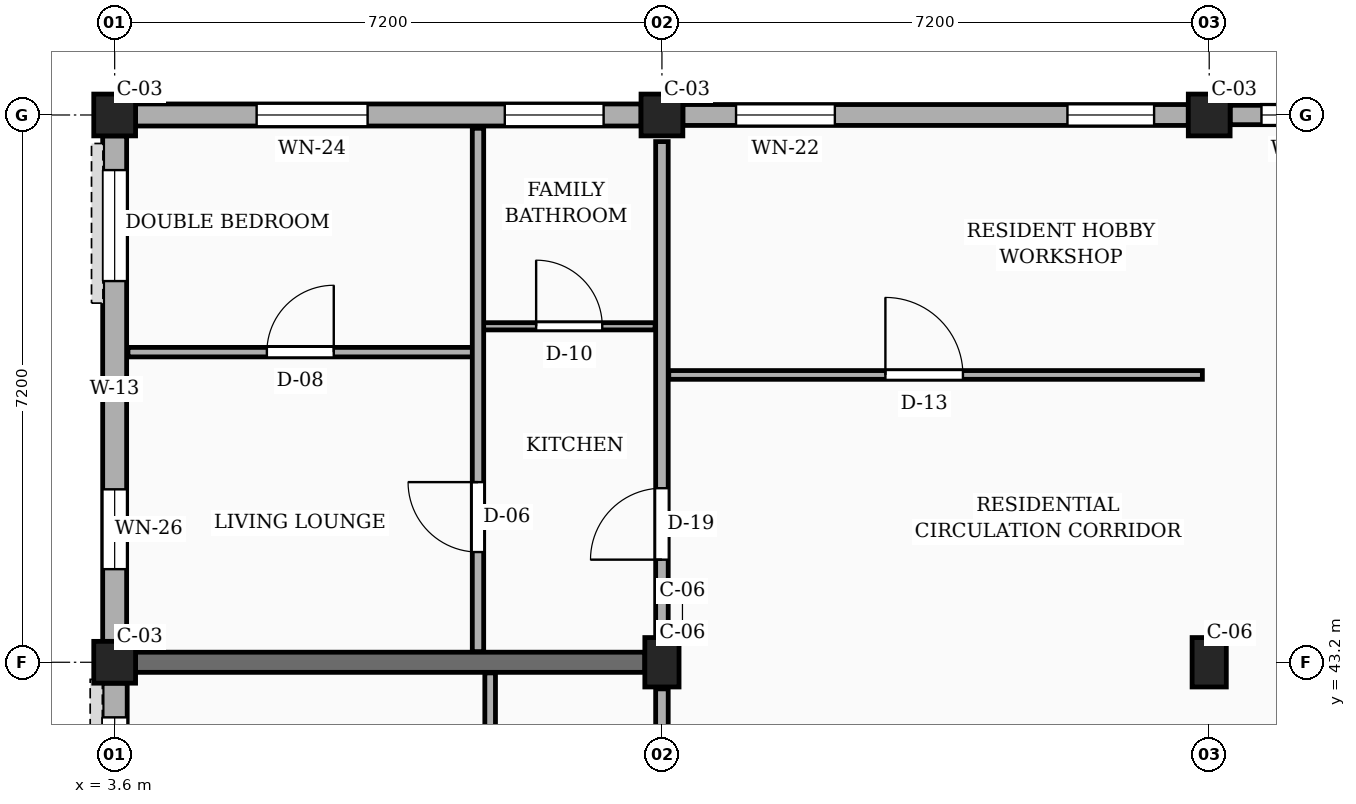
"""IFC4 building model, lengths in metres.
Left out: names, types, materials, properties, quantities, classifications, styles, units other than length and angle.
Written with IfcOpenShell. Run it as: python <this file> out.ifc"""

import sys

from ifc_helpers import new_model, si_unit, direction, frame, frame_2d, origin, origin_2d, place, context, subcontext, project, spatial, rectangle, extrude, element, fill, save


model = new_model("IFC4")
c1 = context("Model", 3, precision=1e-05, world=origin(), true_north=direction((0.0, 1.0)))
c2 = subcontext(c1, "Body", "Model", "MODEL_VIEW")
j1 = project(units=[si_unit("LENGTHUNIT", "METRE"), si_unit("PLANEANGLEUNIT", "RADIAN")], contexts=[c1])
p1 = place(None, origin())
s1 = spatial("IfcSite", under=j1, at=p1, CompositionType="ELEMENT")
p2 = place(p1, origin())
s2 = spatial("IfcBuilding", under=s1, at=p2, CompositionType="ELEMENT")
p3 = place(p2, frame((0.0, 0.0, 10.8)))
s3 = spatial("IfcBuildingStorey", under=s2, at=p3, CompositionType="ELEMENT", Elevation=10.8)
for number, where, z_axis, x_axis in (
    (1, (3.6, 43.2, 0.0), (0.0, 0.0, 1.0), (1.0, 0.0, 0.0)),
    (2, (3.6, 50.4, 0.0), (0.0, 0.0, 1.0), (1.0, 0.0, 0.0)),
):
    element("IfcColumn", number, at=place(p3, frame(where, z_axis=z_axis, x_axis=x_axis)), inside=s3, PredefinedType="COLUMN", context=c2, shape_type="SweptSolid", body=[
        extrude(rectangle(XDim=0.55, YDim=0.55, at=origin_2d()), origin(), (0.0, 0.0, 1.0), 3.15),
    ])
p4 = place(p3, frame((10.8, 43.2, 0.0), z_axis=(0.0, 0.0, 1.0), x_axis=(1.0, 0.0, 0.0)))
e3 = element("IfcColumn", 3, at=p4, inside=s3, PredefinedType="COLUMN", context=c2, shape_type="SweptSolid", body=[
    extrude(rectangle(XDim=0.45, YDim=0.65, at=origin_2d()), origin(), (0.0, 0.0, 1.0), 3.15),
])
p5 = place(p3, frame((10.8, 50.4, 0.0), z_axis=(0.0, 0.0, 1.0), x_axis=(1.0, 0.0, 0.0)))
e4 = element("IfcColumn", 4, at=p5, inside=s3, PredefinedType="COLUMN", context=c2, shape_type="SweptSolid", body=[
    extrude(rectangle(XDim=0.55, YDim=0.55, at=origin_2d()), origin(), (0.0, 0.0, 1.0), 3.15),
])
p6 = place(p3, frame((18.0, 43.2, 0.0), z_axis=(0.0, 0.0, 1.0), x_axis=(1.0, 0.0, 0.0)))
e5 = element("IfcColumn", 5, at=p6, inside=s3, PredefinedType="COLUMN", context=c2, shape_type="SweptSolid", body=[
    extrude(rectangle(XDim=0.45, YDim=0.65, at=origin_2d()), origin(), (0.0, 0.0, 1.0), 3.15),
])
p7 = place(p3, frame((18.0, 50.4, 0.0), z_axis=(0.0, 0.0, 1.0), x_axis=(1.0, 0.0, 0.0)))
e6 = element("IfcColumn", 6, at=p7, inside=s3, PredefinedType="COLUMN", context=c2, shape_type="SweptSolid", body=[
    extrude(rectangle(XDim=0.55, YDim=0.55, at=origin_2d()), origin(), (0.0, 0.0, 1.0), 3.15),
])
p8 = place(p3, frame((3.875, 43.2, 0.0), z_axis=(0.0, 0.0, 1.0), x_axis=(1.0, 0.0, 0.0)))
e7 = element("IfcWall", 7, at=p8, inside=s3, PredefinedType="SOLIDWALL", context=c2, shape_type="SweptSolid", body=[
    extrude(rectangle(XDim=6.7, YDim=0.265, at=frame_2d((3.35, 0.0))), origin(), (0.0, 0.0, 1.0), 2.17),
])
p9 = place(p3, frame((24.925, 50.4, 0.0), z_axis=(0.0, 0.0, 1.0), x_axis=(-1.0, 0.0, 0.0)))
e8 = element("IfcWall", 8, at=p9, inside=s3, PredefinedType="SOLIDWALL", context=c2, shape_type="SweptSolid", body=[
    extrude(rectangle(XDim=6.65, YDim=0.255, at=frame_2d((3.325, 0.0))), origin(), (0.0, 0.0, 1.0), 2.44),
])
p10 = place(p9, frame((2.07, 0.0, 0.78)))
e9 = element("IfcOpeningElement", 9, at=p10, cuts=e8, PredefinedType="OPENING", context=c2, shape_type="SweptSolid", body=[
    extrude(rectangle(XDim=0.98, YDim=1.36, at=frame_2d((0.49, 0.68))), frame((0.0, 0.137, 0.0), z_axis=(0.0, -1.0, 0.0), x_axis=(1.0, 0.0, 0.0)), (0.0, 0.0, 1.0), 0.275),
])
p11 = place(p9, frame((5.097, 0.0, 0.78)))
e10 = element("IfcOpeningElement", 10, at=p11, cuts=e8, PredefinedType="OPENING", context=c2, shape_type="SweptSolid", body=[
    extrude(rectangle(XDim=1.14, YDim=1.36, at=frame_2d((0.57, 0.68))), frame((0.0, 0.137, 0.0), z_axis=(0.0, -1.0, 0.0), x_axis=(1.0, 0.0, 0.0)), (0.0, 0.0, 1.0), 0.275),
])
p12 = place(p3, frame((17.725, 50.4, 0.0), z_axis=(0.0, 0.0, 1.0), x_axis=(-1.0, 0.0, 0.0)))
e11 = element("IfcWall", 11, at=p12, inside=s3, PredefinedType="SOLIDWALL", context=c2, shape_type="SweptSolid", body=[
    extrude(rectangle(XDim=6.65, YDim=0.275, at=frame_2d((3.325, 0.0))), origin(), (0.0, 0.0, 1.0), 2.44),
])
p13 = place(p12, frame((0.45, 0.0, 0.78)))
e12 = element("IfcOpeningElement", 12, at=p13, cuts=e11, PredefinedType="OPENING", context=c2, shape_type="SweptSolid", body=[
    extrude(rectangle(XDim=1.14, YDim=1.36, at=frame_2d((0.57, 0.68))), frame((0.0, 0.147, 0.0), z_axis=(0.0, -1.0, 0.0), x_axis=(1.0, 0.0, 0.0)), (0.0, 0.0, 1.0), 0.295),
])
p14 = place(p12, frame((4.65, 0.0, 0.78)))
e13 = element("IfcOpeningElement", 13, at=p14, cuts=e11, PredefinedType="OPENING", context=c2, shape_type="SweptSolid", body=[
    extrude(rectangle(XDim=1.3, YDim=1.36, at=frame_2d((0.65, 0.68))), frame((0.0, 0.147, 0.0), z_axis=(0.0, -1.0, 0.0), x_axis=(1.0, 0.0, 0.0)), (0.0, 0.0, 1.0), 0.295),
])
p15 = place(p3, frame((10.525, 50.4, 0.0), z_axis=(0.0, 0.0, 1.0), x_axis=(-1.0, 0.0, 0.0)))
e14 = element("IfcWall", 14, at=p15, inside=s3, PredefinedType="SOLIDWALL", context=c2, shape_type="SweptSolid", body=[
    extrude(rectangle(XDim=6.65, YDim=0.29, at=frame_2d((3.325, 0.0))), origin(), (0.0, 0.0, 1.0), 2.44),
])
p16 = place(p15, frame((0.492, 0.0, 0.78)))
e15 = element("IfcOpeningElement", 15, at=p16, cuts=e14, PredefinedType="OPENING", context=c2, shape_type="SweptSolid", body=[
    extrude(rectangle(XDim=1.3, YDim=1.36, at=frame_2d((0.65, 0.68))), frame((0.0, 0.155, 0.0), z_axis=(0.0, -1.0, 0.0), x_axis=(1.0, 0.0, 0.0)), (0.0, 0.0, 1.0), 0.31),
])
p17 = place(p15, frame((3.597, 0.0, 0.78)))
e16 = element("IfcOpeningElement", 16, at=p17, cuts=e14, PredefinedType="OPENING", context=c2, shape_type="SweptSolid", body=[
    extrude(rectangle(XDim=1.46, YDim=1.36, at=frame_2d((0.73, 0.68))), frame((0.0, 0.155, 0.0), z_axis=(0.0, -1.0, 0.0), x_axis=(1.0, 0.0, 0.0)), (0.0, 0.0, 1.0), 0.31),
])
p18 = place(p3, frame((3.6, 50.125, 0.0), z_axis=(0.0, 0.0, 1.0), x_axis=(0.0, -1.0, 0.0)))
e17 = element("IfcWall", 17, at=p18, inside=s3, PredefinedType="SOLIDWALL", context=c2, shape_type="SweptSolid", body=[
    extrude(rectangle(XDim=6.65, YDim=0.315, at=frame_2d((3.325, 0.0))), origin(), (0.0, 0.0, 1.0), 2.44),
])
p19 = place(p18, frame((0.45, 0.0, 0.78)))
e18 = element("IfcOpeningElement", 18, at=p19, cuts=e17, PredefinedType="OPENING", context=c2, shape_type="SweptSolid", body=[
    extrude(rectangle(XDim=1.46, YDim=1.36, at=frame_2d((0.73, 0.68))), frame((0.0, 0.167, 0.0), z_axis=(0.0, -1.0, 0.0), x_axis=(1.0, 0.0, 0.0)), (0.0, 0.0, 1.0), 0.335),
])
p20 = place(p18, frame((4.65, 0.0, 0.78)))
e19 = element("IfcOpeningElement", 19, at=p20, cuts=e17, PredefinedType="OPENING", context=c2, shape_type="SweptSolid", body=[
    extrude(rectangle(XDim=1.05, YDim=1.44, at=frame_2d((0.525, 0.72))), frame((0.0, 0.167, 0.0), z_axis=(0.0, -1.0, 0.0), x_axis=(1.0, 0.0, 0.0)), (0.0, 0.0, 1.0), 0.335),
])
p21 = place(p3, frame((3.6, 42.925, 0.0), z_axis=(0.0, 0.0, 1.0), x_axis=(0.0, -1.0, 0.0)))
e20 = element("IfcWall", 20, at=p21, inside=s3, PredefinedType="SOLIDWALL", context=c2, shape_type="SweptSolid", body=[
    extrude(rectangle(XDim=6.65, YDim=0.33, at=frame_2d((3.325, 0.0))), origin(), (0.0, 0.0, 1.0), 2.44),
])
p22 = place(p21, frame((0.45, 0.0, 0.78)))
e21 = element("IfcOpeningElement", 21, at=p22, cuts=e20, PredefinedType="OPENING", context=c2, shape_type="SweptSolid", body=[
    extrude(rectangle(XDim=1.05, YDim=1.44, at=frame_2d((0.525, 0.72))), frame((0.0, 0.175, 0.0), z_axis=(0.0, -1.0, 0.0), x_axis=(1.0, 0.0, 0.0)), (0.0, 0.0, 1.0), 0.35),
])
p23 = place(p21, frame((4.65, 0.0, 0.78)))
e22 = element("IfcOpeningElement", 22, at=p23, cuts=e20, PredefinedType="OPENING", context=c2, shape_type="SweptSolid", body=[
    extrude(rectangle(XDim=1.25, YDim=1.44, at=frame_2d((0.625, 0.72))), frame((0.0, 0.175, 0.0), z_axis=(0.0, -1.0, 0.0), x_axis=(1.0, 0.0, 0.0)), (0.0, 0.0, 1.0), 0.35),
])
p24 = place(p3, frame((10.8, 36.35, 0.0), z_axis=(0.0, 0.0, 1.0), x_axis=(0.0, 1.0, 0.0)))
e23 = element("IfcWall", 23, at=p24, inside=s3, PredefinedType="PARTITIONING", context=c2, shape_type="SweptSolid", body=[
    extrude(rectangle(XDim=6.5, YDim=0.165, at=frame_2d((3.25, 0.0))), origin(), (0.0, 0.0, 1.0), 2.22),
])
p25 = place(p24, frame((1.0, 0.0, 0.0)))
e24 = element("IfcOpeningElement", 24, at=p25, cuts=e23, PredefinedType="OPENING", context=c2, shape_type="SweptSolid", body=[
    extrude(rectangle(XDim=1.0, YDim=2.15, at=frame_2d((0.5, 1.075))), frame((0.0, 0.093, 0.0), z_axis=(0.0, -1.0, 0.0), x_axis=(1.0, 0.0, 0.0)), (0.0, 0.0, 1.0), 0.185),
])
p26 = place(p3, frame((10.8, 43.55, 0.0), z_axis=(0.0, 0.0, 1.0), x_axis=(0.0, 1.0, 0.0)))
e25 = element("IfcWall", 25, at=p26, inside=s3, PredefinedType="PARTITIONING", context=c2, shape_type="SweptSolid", body=[
    extrude(rectangle(XDim=6.5, YDim=0.165, at=frame_2d((3.25, 0.0))), origin(), (0.0, 0.0, 1.0), 2.22),
])
p27 = place(p26, frame((1.0, 0.0, 0.0)))
e26 = element("IfcOpeningElement", 26, at=p27, cuts=e25, PredefinedType="OPENING", context=c2, shape_type="SweptSolid", body=[
    extrude(rectangle(XDim=0.94, YDim=2.12, at=frame_2d((0.47, 1.06))), frame((0.0, 0.093, 0.0), z_axis=(0.0, -1.0, 0.0), x_axis=(1.0, 0.0, 0.0)), (0.0, 0.0, 1.0), 0.185),
])
p28 = place(p3, frame((8.54, 36.14, 0.0), z_axis=(0.0, 0.0, 1.0), x_axis=(0.0, 1.0, 0.0)))
e27 = element("IfcWall", 27, at=p28, inside=s3, PredefinedType="PARTITIONING", context=c2, shape_type="SweptSolid", body=[
    extrude(rectangle(XDim=6.92, YDim=0.14, at=frame_2d((3.46, 0.0))), origin(), (0.0, 0.0, 1.0), 2.305),
])
p29 = place(p28, frame((1.31, 0.0, 0.0)))
e28 = element("IfcOpeningElement", 28, at=p29, cuts=e27, PredefinedType="OPENING", context=c2, shape_type="SweptSolid", body=[
    extrude(rectangle(XDim=0.95, YDim=2.1, at=frame_2d((0.475, 1.05))), frame((0.0, 0.08, 0.0), z_axis=(0.0, -1.0, 0.0), x_axis=(1.0, 0.0, 0.0)), (0.0, 0.0, 1.0), 0.16),
])
p30 = place(p3, frame((10.89, 46.98, 0.0), z_axis=(0.0, 0.0, 1.0), x_axis=(1.0, 0.0, 0.0)))
e29 = element("IfcWall", 29, at=p30, inside=s3, PredefinedType="PARTITIONING", context=c2, shape_type="SweptSolid", body=[
    extrude(rectangle(XDim=7.02, YDim=0.115, at=frame_2d((3.51, 0.0))), origin(), (0.0, 0.0, 1.0), 2.305),
])
p31 = place(p30, frame((2.85, 0.0, 0.0)))
e30 = element("IfcOpeningElement", 30, at=p31, cuts=e29, PredefinedType="OPENING", context=c2, shape_type="SweptSolid", body=[
    extrude(rectangle(XDim=1.02, YDim=2.15, at=frame_2d((0.51, 1.075))), frame((0.0, 0.067, 0.0), z_axis=(0.0, -1.0, 0.0), x_axis=(1.0, 0.0, 0.0)), (0.0, 0.0, 1.0), 0.135),
])
p32 = place(p3, frame((3.775, 47.28, 0.0), z_axis=(0.0, 0.0, 1.0), x_axis=(1.0, 0.0, 0.0)))
e31 = element("IfcWall", 31, at=p32, inside=s3, PredefinedType="PARTITIONING", context=c2, shape_type="SweptSolid", body=[
    extrude(rectangle(XDim=4.535, YDim=0.125, at=frame_2d((2.268, 0.0))), origin(), (0.0, 0.0, 1.0), 2.305),
])
p33 = place(p32, frame((1.827, 0.0, 0.0)))
e32 = element("IfcOpeningElement", 32, at=p33, cuts=e31, PredefinedType="OPENING", context=c2, shape_type="SweptSolid", body=[
    extrude(rectangle(XDim=0.88, YDim=2.08, at=frame_2d((0.44, 1.04))), frame((0.0, 0.073, 0.0), z_axis=(0.0, -1.0, 0.0), x_axis=(1.0, 0.0, 0.0)), (0.0, 0.0, 1.0), 0.145),
])
p34 = place(p3, frame((8.45, 47.62, 0.0), z_axis=(0.0, 0.0, 1.0), x_axis=(1.0, 0.0, 0.0)))
e33 = element("IfcWall", 33, at=p34, inside=s3, PredefinedType="PARTITIONING", context=c2, shape_type="SweptSolid", body=[
    extrude(rectangle(XDim=2.26, YDim=0.095, at=frame_2d((1.13, 0.0))), origin(), (0.0, 0.0, 1.0), 2.305),
])
p35 = place(p34, frame((0.695, 0.0, 0.0)))
e34 = element("IfcOpeningElement", 34, at=p35, cuts=e33, PredefinedType="OPENING", context=c2, shape_type="SweptSolid", body=[
    extrude(rectangle(XDim=0.87, YDim=2.05, at=frame_2d((0.435, 1.025))), frame((0.0, 0.058, 0.0), z_axis=(0.0, -1.0, 0.0), x_axis=(1.0, 0.0, 0.0)), (0.0, 0.0, 1.0), 0.115),
])
p36 = place(p3, frame((8.38, 43.34, 0.0), z_axis=(0.0, 0.0, 1.0), x_axis=(0.0, 1.0, 0.0)))
e35 = element("IfcWall", 35, at=p36, inside=s3, PredefinedType="PARTITIONING", context=c2, shape_type="SweptSolid", body=[
    extrude(rectangle(XDim=6.885, YDim=0.15, at=frame_2d((3.442, 0.0))), origin(), (0.0, 0.0, 1.0), 2.305),
])
p37 = place(p36, frame((1.31, 0.0, 0.0)))
e36 = element("IfcOpeningElement", 36, at=p37, cuts=e35, PredefinedType="OPENING", context=c2, shape_type="SweptSolid", body=[
    extrude(rectangle(XDim=0.92, YDim=2.1, at=frame_2d((0.46, 1.05))), frame((0.0, 0.085, 0.0), z_axis=(0.0, -1.0, 0.0), x_axis=(1.0, 0.0, 0.0)), (0.0, 0.0, 1.0), 0.17),
])
p38 = place(p11, origin())
e37 = element("IfcWindow", 37, at=p38, inside=s3, PartitioningType="SINGLE_PANEL", PredefinedType="WINDOW", context=c2, shape_type="SweptSolid", body=[
    extrude(rectangle(XDim=1.14, YDim=1.36, at=frame_2d((0.57, 0.68))), frame((0.0, 0.03, 0.0), z_axis=(0.0, -1.0, 0.0), x_axis=(1.0, 0.0, 0.0)), (0.0, 0.0, 1.0), 0.06),
])
fill(e10, e37)
p39 = place(p13, origin())
e38 = element("IfcWindow", 38, at=p39, inside=s3, PartitioningType="SINGLE_PANEL", PredefinedType="WINDOW", context=c2, shape_type="SweptSolid", body=[
    extrude(rectangle(XDim=1.14, YDim=1.36, at=frame_2d((0.57, 0.68))), frame((0.0, 0.03, 0.0), z_axis=(0.0, -1.0, 0.0), x_axis=(1.0, 0.0, 0.0)), (0.0, 0.0, 1.0), 0.06),
])
fill(e12, e38)
p40 = place(p14, origin())
e39 = element("IfcWindow", 39, at=p40, inside=s3, PartitioningType="SINGLE_PANEL", PredefinedType="WINDOW", context=c2, shape_type="SweptSolid", body=[
    extrude(rectangle(XDim=1.3, YDim=1.36, at=frame_2d((0.65, 0.68))), frame((0.0, 0.03, 0.0), z_axis=(0.0, -1.0, 0.0), x_axis=(1.0, 0.0, 0.0)), (0.0, 0.0, 1.0), 0.06),
])
fill(e13, e39)
p41 = place(p16, origin())
e40 = element("IfcWindow", 40, at=p41, inside=s3, PartitioningType="SINGLE_PANEL", PredefinedType="WINDOW", context=c2, shape_type="SweptSolid", body=[
    extrude(rectangle(XDim=1.3, YDim=1.36, at=frame_2d((0.65, 0.68))), frame((0.0, 0.03, 0.0), z_axis=(0.0, -1.0, 0.0), x_axis=(1.0, 0.0, 0.0)), (0.0, 0.0, 1.0), 0.06),
])
fill(e15, e40)
p42 = place(p17, origin())
e41 = element("IfcWindow", 41, at=p42, inside=s3, PartitioningType="SINGLE_PANEL", PredefinedType="WINDOW", context=c2, shape_type="SweptSolid", body=[
    extrude(rectangle(XDim=1.46, YDim=1.36, at=frame_2d((0.73, 0.68))), frame((0.0, 0.03, 0.0), z_axis=(0.0, -1.0, 0.0), x_axis=(1.0, 0.0, 0.0)), (0.0, 0.0, 1.0), 0.06),
])
fill(e16, e41)
p43 = place(p19, origin())
e42 = element("IfcWindow", 42, at=p43, inside=s3, PartitioningType="SINGLE_PANEL", PredefinedType="WINDOW", context=c2, shape_type="SweptSolid", body=[
    extrude(rectangle(XDim=1.46, YDim=1.36, at=frame_2d((0.73, 0.68))), frame((0.0, 0.03, 0.0), z_axis=(0.0, -1.0, 0.0), x_axis=(1.0, 0.0, 0.0)), (0.0, 0.0, 1.0), 0.06),
])
fill(e18, e42)
p44 = place(p20, origin())
e43 = element("IfcWindow", 43, at=p44, inside=s3, PartitioningType="SINGLE_PANEL", PredefinedType="WINDOW", context=c2, shape_type="SweptSolid", body=[
    extrude(rectangle(XDim=1.05, YDim=1.44, at=frame_2d((0.525, 0.72))), frame((0.0, 0.03, 0.0), z_axis=(0.0, -1.0, 0.0), x_axis=(1.0, 0.0, 0.0)), (0.0, 0.0, 1.0), 0.06),
])
fill(e19, e43)
p45 = place(p22, origin())
e44 = element("IfcWindow", 44, at=p45, inside=s3, PartitioningType="SINGLE_PANEL", PredefinedType="WINDOW", context=c2, shape_type="SweptSolid", body=[
    extrude(rectangle(XDim=1.05, YDim=1.44, at=frame_2d((0.525, 0.72))), frame((0.0, 0.03, 0.0), z_axis=(0.0, -1.0, 0.0), x_axis=(1.0, 0.0, 0.0)), (0.0, 0.0, 1.0), 0.06),
])
fill(e21, e44)
p46 = place(p27, origin())
e45 = element("IfcDoor", 45, at=p46, inside=s3, OperationType="SINGLE_SWING_LEFT", PredefinedType="DOOR", context=c2, shape_type="SweptSolid", body=[
    extrude(rectangle(XDim=0.94, YDim=2.12, at=frame_2d((0.47, 1.06))), frame((0.0, 0.025, 0.0), z_axis=(0.0, -1.0, 0.0), x_axis=(1.0, 0.0, 0.0)), (0.0, 0.0, 1.0), 0.05),
])
fill(e26, e45)
p47 = place(p31, origin())
e46 = element("IfcDoor", 46, at=p47, inside=s3, OperationType="SINGLE_SWING_LEFT", PredefinedType="DOOR", context=c2, shape_type="SweptSolid", body=[
    extrude(rectangle(XDim=1.02, YDim=2.15, at=frame_2d((0.51, 1.075))), frame((0.0, 0.025, 0.0), z_axis=(0.0, -1.0, 0.0), x_axis=(1.0, 0.0, 0.0)), (0.0, 0.0, 1.0), 0.05),
])
fill(e30, e46)
p48 = place(p33, origin())
e47 = element("IfcDoor", 47, at=p48, inside=s3, OperationType="SINGLE_SWING_RIGHT", PredefinedType="DOOR", context=c2, shape_type="SweptSolid", body=[
    extrude(rectangle(XDim=0.88, YDim=2.08, at=frame_2d((0.44, 1.04))), frame((0.0, 0.025, 0.0), z_axis=(0.0, -1.0, 0.0), x_axis=(1.0, 0.0, 0.0)), (0.0, 0.0, 1.0), 0.05),
])
fill(e32, e47)
p49 = place(p35, origin())
e48 = element("IfcDoor", 48, at=p49, inside=s3, OperationType="SINGLE_SWING_LEFT", PredefinedType="DOOR", context=c2, shape_type="SweptSolid", body=[
    extrude(rectangle(XDim=0.87, YDim=2.05, at=frame_2d((0.435, 1.025))), frame((0.0, 0.025, 0.0), z_axis=(0.0, -1.0, 0.0), x_axis=(1.0, 0.0, 0.0)), (0.0, 0.0, 1.0), 0.05),
])
fill(e34, e48)
p50 = place(p37, origin())
e49 = element("IfcDoor", 49, at=p50, inside=s3, OperationType="SINGLE_SWING_RIGHT", PredefinedType="DOOR", context=c2, shape_type="SweptSolid", body=[
    extrude(rectangle(XDim=0.92, YDim=2.1, at=frame_2d((0.46, 1.05))), frame((0.0, 0.025, 0.0), z_axis=(0.0, -1.0, 0.0), x_axis=(1.0, 0.0, 0.0)), (0.0, 0.0, 1.0), 0.05),
])
fill(e36, e49)
save(model, sys.argv[1])
